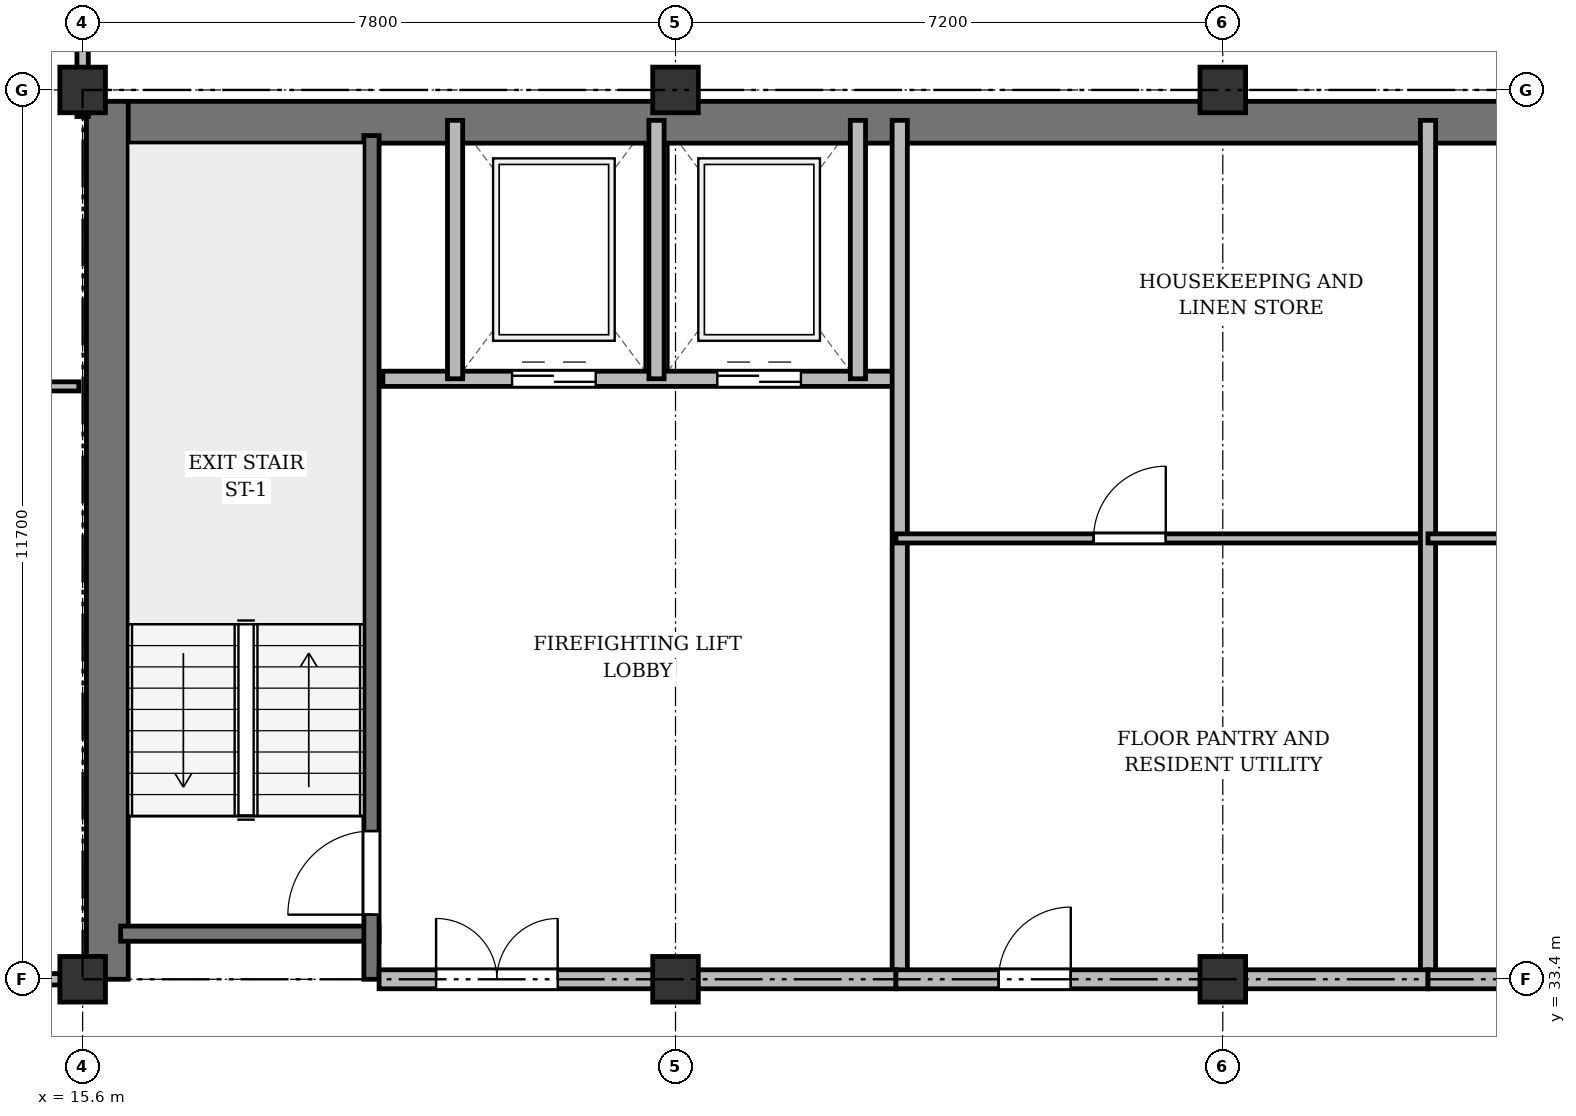
"""IFC4 building model, lengths in metres.
Left out: names, types, materials, properties, quantities, classifications, styles, units other than length and angle.
Written with IfcOpenShell. Run it as: python <this file> out.ifc"""

import sys

from ifc_helpers import new_model, si_unit, direction, frame, frame_2d, origin, origin_2d, place, context, subcontext, project, spatial, rectangle, extrude, source, transform, mapped, element, fill, save


model = new_model("IFC4")
c1 = context("Model", 3, precision=1e-05, world=origin(), true_north=direction((0.0, 1.0)))
c2 = subcontext(c1, "Body", "Model", "MODEL_VIEW")
j1 = project(units=[si_unit("LENGTHUNIT", "METRE"), si_unit("PLANEANGLEUNIT", "RADIAN")], contexts=[c1])
p1 = place(None, origin())
s1 = spatial("IfcSite", under=j1, at=p1, CompositionType="ELEMENT")
p2 = place(p1, origin())
s2 = spatial("IfcBuilding", under=s1, at=p2, CompositionType="ELEMENT")
p3 = place(p2, frame((0.0, 0.0, 281.1)))
s3 = spatial("IfcBuildingStorey", under=s2, at=p3, CompositionType="ELEMENT", Elevation=281.1)
m1 = source(origin(), c2, "Body", "SweptSolid", [
    extrude(rectangle(XDim=0.6, YDim=0.6, at=origin_2d()), origin(), (0.0, 0.0, 1.0), 3.6),
])
for number, where, z_axis, x_axis in (
    (1, (15.6, 33.4, 0.0), (0.0, 0.0, 1.0), (1.0, 0.0, 0.0)),
    (2, (15.6, 45.1, 0.0), (0.0, 0.0, 1.0), (1.0, 0.0, 0.0)),
    (3, (23.4, 33.4, 0.0), (0.0, 0.0, 1.0), (1.0, 0.0, 0.0)),
    (4, (23.4, 45.1, 0.0), (0.0, 0.0, 1.0), (1.0, 0.0, 0.0)),
    (5, (30.6, 33.4, 0.0), (0.0, 0.0, 1.0), (1.0, 0.0, 0.0)),
    (6, (30.6, 45.1, 0.0), (0.0, 0.0, 1.0), (1.0, 0.0, 0.0)),
):
    element("IfcColumn", number, at=place(p3, frame(where, z_axis=z_axis, x_axis=x_axis)), inside=s3, PredefinedType="COLUMN", context=c2, shape_type="MappedRepresentation", body=[
        mapped(m1, transform((0.0, 0.0, 0.0), x_axis=(1.0, 0.0, 0.0), y_axis=(0.0, 1.0, 0.0), z_axis=(0.0, 0.0, 1.0), scale=1.0)),
    ])
p4 = place(p3, frame((15.65, 44.675, 0.0), z_axis=(0.0, 0.0, 1.0), x_axis=(1.0, 0.0, 0.0)))
e7 = element("IfcWall", 7, at=p4, inside=s3, PredefinedType="SHEAR", context=c2, shape_type="SweptSolid", body=[
    extrude(rectangle(XDim=43.1, YDim=0.55, at=frame_2d((21.55, 0.0))), origin(), (0.0, 0.0, 1.0), 3.37),
])
p5 = place(p3, frame((15.925, 33.4, 0.0), z_axis=(0.0, 0.0, 1.0), x_axis=(0.0, 1.0, 0.0)))
e8 = element("IfcWall", 8, at=p5, inside=s3, PredefinedType="SHEAR", context=c2, shape_type="SweptSolid", body=[
    extrude(rectangle(XDim=11.55, YDim=0.55, at=frame_2d((5.775, 0.0))), origin(), (0.0, 0.0, 1.0), 3.37),
])
p6 = place(p3, frame((16.1, 34.0, 0.0), z_axis=(0.0, 0.0, 1.0), x_axis=(1.0, 0.0, 0.0)))
e9 = element("IfcWall", 9, at=p6, inside=s3, PredefinedType="SHEAR", context=c2, shape_type="SweptSolid", body=[
    extrude(rectangle(XDim=3.4, YDim=0.2, at=frame_2d((1.7, 0.0))), origin(), (0.0, 0.0, 1.0), 3.37),
])
p7 = place(p3, frame((19.4, 33.4, 0.0), z_axis=(0.0, 0.0, 1.0), x_axis=(0.0, 1.0, 0.0)))
e10 = element("IfcWall", 10, at=p7, inside=s3, PredefinedType="SHEAR", context=c2, shape_type="SweptSolid", body=[
    extrude(rectangle(XDim=11.1, YDim=0.2, at=frame_2d((5.55, 0.0))), origin(), (0.0, 0.0, 1.0), 3.37),
])
p8 = place(p7, frame((0.85, 0.0, 0.0)))
e11 = element("IfcOpeningElement", 11, at=p8, cuts=e10, PredefinedType="OPENING", context=c2, shape_type="SweptSolid", body=[
    extrude(rectangle(XDim=1.1, YDim=2.15, at=frame_2d((0.55, 1.075))), frame((0.0, 0.11, 0.0), z_axis=(0.0, -1.0, 0.0), x_axis=(1.0, 0.0, 0.0)), (0.0, 0.0, 1.0), 0.22),
])
p9 = place(p3, frame((19.55, 41.3, 0.0), z_axis=(0.0, 0.0, 1.0), x_axis=(1.0, 0.0, 0.0)))
e12 = element("IfcWall", 12, at=p9, inside=s3, PredefinedType="SOLIDWALL", context=c2, shape_type="SweptSolid", body=[
    extrude(rectangle(XDim=6.75, YDim=0.2, at=frame_2d((3.375, 0.0))), origin(), (0.0, 0.0, 1.0), 3.37),
])
p10 = place(p9, frame((1.7, 0.0, 0.0)))
e13 = element("IfcOpeningElement", 13, at=p10, cuts=e12, PredefinedType="OPENING", context=c2, shape_type="SweptSolid", body=[
    extrude(rectangle(XDim=1.1, YDim=2.15, at=frame_2d((0.55, 1.075))), frame((0.0, 0.11, 0.0), z_axis=(0.0, -1.0, 0.0), x_axis=(1.0, 0.0, 0.0)), (0.0, 0.0, 1.0), 0.22),
])
p11 = place(p9, frame((4.4, 0.0, 0.0)))
e14 = element("IfcOpeningElement", 14, at=p11, cuts=e12, PredefinedType="OPENING", context=c2, shape_type="SweptSolid", body=[
    extrude(rectangle(XDim=1.1, YDim=2.15, at=frame_2d((0.55, 1.075))), frame((0.0, 0.11, 0.0), z_axis=(0.0, -1.0, 0.0), x_axis=(1.0, 0.0, 0.0)), (0.0, 0.0, 1.0), 0.22),
])
for number, where, z_axis, x_axis in (
    (15, (20.5, 41.3, 0.0), (0.0, 0.0, 1.0), (0.0, 1.0, 0.0)),
    (16, (23.15, 41.3, 0.0), (0.0, 0.0, 1.0), (0.0, 1.0, 0.0)),
    (17, (25.8, 41.3, 0.0), (0.0, 0.0, 1.0), (0.0, 1.0, 0.0)),
):
    element("IfcWall", number, at=place(p3, frame(where, z_axis=z_axis, x_axis=x_axis)), inside=s3, PredefinedType="SOLIDWALL", context=c2, shape_type="SweptSolid", body=[
        extrude(rectangle(XDim=3.4, YDim=0.2, at=frame_2d((1.7, 0.0))), origin(), (0.0, 0.0, 1.0), 3.37),
    ])
p12 = place(p3, frame((26.35, 33.4, 0.0), z_axis=(0.0, 0.0, 1.0), x_axis=(0.0, 1.0, 0.0)))
e18 = element("IfcWall", 18, at=p12, inside=s3, PredefinedType="SOLIDWALL", context=c2, shape_type="SweptSolid", body=[
    extrude(rectangle(XDim=11.3, YDim=0.2, at=frame_2d((5.65, 0.0))), origin(), (0.0, 0.0, 1.0), 2.92),
])
p13 = place(p3, frame((19.5, 33.4, 0.0), z_axis=(0.0, 0.0, 1.0), x_axis=(1.0, 0.0, 0.0)))
e19 = element("IfcWall", 19, at=p13, inside=s3, PredefinedType="PARTITIONING", context=c2, shape_type="SweptSolid", body=[
    extrude(rectangle(XDim=6.8, YDim=0.25, at=frame_2d((3.4, 0.0))), origin(), (0.0, 0.0, 1.0), 2.92),
])
p14 = place(p13, frame((0.75, 0.0, 0.0)))
e20 = element("IfcOpeningElement", 20, at=p14, cuts=e19, PredefinedType="OPENING", context=c2, shape_type="SweptSolid", body=[
    extrude(rectangle(XDim=1.6, YDim=2.2, at=frame_2d((0.8, 1.1))), frame((0.0, 0.135, 0.0), z_axis=(0.0, -1.0, 0.0), x_axis=(1.0, 0.0, 0.0)), (0.0, 0.0, 1.0), 0.27),
])
p15 = place(p3, frame((26.3, 39.2, 0.0), z_axis=(0.0, 0.0, 1.0), x_axis=(1.0, 0.0, 0.0)))
e21 = element("IfcWall", 21, at=p15, inside=s3, PredefinedType="PARTITIONING", context=c2, shape_type="SweptSolid", body=[
    extrude(rectangle(XDim=7.0, YDim=0.12, at=frame_2d((3.5, 0.0))), origin(), (0.0, 0.0, 1.0), 2.87),
])
p16 = place(p15, frame((2.6, 0.0, 0.0)))
e22 = element("IfcOpeningElement", 22, at=p16, cuts=e21, PredefinedType="OPENING", context=c2, shape_type="SweptSolid", body=[
    extrude(rectangle(XDim=0.95, YDim=2.15, at=frame_2d((0.475, 1.075))), frame((0.0, 0.07, 0.0), z_axis=(0.0, -1.0, 0.0), x_axis=(1.0, 0.0, 0.0)), (0.0, 0.0, 1.0), 0.14),
])
p17 = place(p3, frame((33.3, 33.4, 0.0), z_axis=(0.0, 0.0, 1.0), x_axis=(0.0, 1.0, 0.0)))
e23 = element("IfcWall", 23, at=p17, inside=s3, PredefinedType="SOLIDWALL", context=c2, shape_type="SweptSolid", body=[
    extrude(rectangle(XDim=11.3, YDim=0.2, at=frame_2d((5.65, 0.0))), origin(), (0.0, 0.0, 1.0), 2.92),
])
p18 = place(p3, frame((33.3, 39.2, 0.0), z_axis=(0.0, 0.0, 1.0), x_axis=(1.0, 0.0, 0.0)))
e24 = element("IfcWall", 24, at=p18, inside=s3, PredefinedType="PARTITIONING", context=c2, shape_type="SweptSolid", body=[
    extrude(rectangle(XDim=6.8, YDim=0.12, at=frame_2d((3.4, 0.0))), origin(), (0.0, 0.0, 1.0), 3.37),
])
p19 = place(p18, frame((2.6, 0.0, 0.0)))
e25 = element("IfcOpeningElement", 25, at=p19, cuts=e24, PredefinedType="OPENING", context=c2, shape_type="SweptSolid", body=[
    extrude(rectangle(XDim=0.95, YDim=2.15, at=frame_2d((0.475, 1.075))), frame((0.0, 0.07, 0.0), z_axis=(0.0, -1.0, 0.0), x_axis=(1.0, 0.0, 0.0)), (0.0, 0.0, 1.0), 0.14),
])
p20 = place(p3, frame((26.3, 33.4, 0.0), z_axis=(0.0, 0.0, 1.0), x_axis=(1.0, 0.0, 0.0)))
e26 = element("IfcWall", 26, at=p20, inside=s3, PredefinedType="PARTITIONING", context=c2, shape_type="SweptSolid", body=[
    extrude(rectangle(XDim=7.0, YDim=0.25, at=frame_2d((3.5, 0.0))), origin(), (0.0, 0.0, 1.0), 2.92),
])
p21 = place(p20, frame((1.35, 0.0, 0.0)))
e27 = element("IfcOpeningElement", 27, at=p21, cuts=e26, PredefinedType="OPENING", context=c2, shape_type="SweptSolid", body=[
    extrude(rectangle(XDim=0.95, YDim=2.15, at=frame_2d((0.475, 1.075))), frame((0.0, 0.135, 0.0), z_axis=(0.0, -1.0, 0.0), x_axis=(1.0, 0.0, 0.0)), (0.0, 0.0, 1.0), 0.27),
])
p22 = place(p3, frame((33.3, 33.4, 0.0), z_axis=(0.0, 0.0, 1.0), x_axis=(1.0, 0.0, 0.0)))
e28 = element("IfcWall", 28, at=p22, inside=s3, PredefinedType="PARTITIONING", context=c2, shape_type="SweptSolid", body=[
    extrude(rectangle(XDim=6.8, YDim=0.25, at=frame_2d((3.4, 0.0))), origin(), (0.0, 0.0, 1.0), 2.92),
])
p23 = place(p22, frame((2.4, 0.0, 0.0)))
e29 = element("IfcOpeningElement", 29, at=p23, cuts=e28, PredefinedType="OPENING", context=c2, shape_type="SweptSolid", body=[
    extrude(rectangle(XDim=1.0, YDim=2.15, at=frame_2d((0.5, 1.075))), frame((0.0, 0.135, 0.0), z_axis=(0.0, -1.0, 0.0), x_axis=(1.0, 0.0, 0.0)), (0.0, 0.0, 1.0), 0.27),
])
p24 = place(p3, frame((8.5, 41.2, 0.0), z_axis=(0.0, 0.0, 1.0), x_axis=(1.0, 0.0, 0.0)))
e30 = element("IfcWall", 30, at=p24, inside=s3, PredefinedType="PARTITIONING", context=c2, shape_type="SweptSolid", body=[
    extrude(rectangle(XDim=7.05, YDim=0.12, at=frame_2d((3.525, 0.0))), origin(), (0.0, 0.0, 1.0), 2.87),
])
p25 = place(p24, frame((2.958, 0.0, 0.0)))
e31 = element("IfcOpeningElement", 31, at=p25, cuts=e30, PredefinedType="OPENING", context=c2, shape_type="SweptSolid", body=[
    extrude(rectangle(XDim=0.95, YDim=2.15, at=frame_2d((0.475, 1.075))), frame((0.0, 0.07, 0.0), z_axis=(0.0, -1.0, 0.0), x_axis=(1.0, 0.0, 0.0)), (0.0, 0.0, 1.0), 0.14),
])
p26 = place(p3, frame((8.45, 33.4, 0.0), z_axis=(0.0, 0.0, 1.0), x_axis=(1.0, 0.0, 0.0)))
e32 = element("IfcWall", 32, at=p26, inside=s3, PredefinedType="PARTITIONING", context=c2, shape_type="SweptSolid", body=[
    extrude(rectangle(XDim=7.15, YDim=0.15, at=frame_2d((3.575, 0.0))), origin(), (0.0, 0.0, 1.0), 2.92),
])
p27 = place(p26, frame((3.0, 0.0, 0.0)))
e33 = element("IfcOpeningElement", 33, at=p27, cuts=e32, PredefinedType="OPENING", context=c2, shape_type="SweptSolid", body=[
    extrude(rectangle(XDim=0.95, YDim=2.15, at=frame_2d((0.475, 1.075))), frame((0.0, 0.085, 0.0), z_axis=(0.0, -1.0, 0.0), x_axis=(1.0, 0.0, 0.0)), (0.0, 0.0, 1.0), 0.17),
])
p28 = place(p3, frame((15.6, 44.75, 0.0), z_axis=(0.0, 0.0, 1.0), x_axis=(0.0, 1.0, 0.0)))
e34 = element("IfcWall", 34, at=p28, inside=s3, PredefinedType="PARTITIONING", context=c2, shape_type="SweptSolid", body=[
    extrude(rectangle(XDim=3.61, YDim=0.15, at=frame_2d((1.805, 0.0))), origin(), (0.0, 0.0, 1.0), 2.87),
])
p29 = place(p28, frame((1.1, 0.0, 0.0)))
e35 = element("IfcOpeningElement", 35, at=p29, cuts=e34, PredefinedType="OPENING", context=c2, shape_type="SweptSolid", body=[
    extrude(rectangle(XDim=0.95, YDim=2.15, at=frame_2d((0.475, 1.075))), frame((0.0, 0.085, 0.0), z_axis=(0.0, -1.0, 0.0), x_axis=(1.0, 0.0, 0.0)), (0.0, 0.0, 1.0), 0.17),
])
m2 = source(origin(), c2, "Body", "SweptSolid", [
    extrude(rectangle(XDim=1.1, YDim=2.15, at=frame_2d((0.55, 1.075))), frame((0.0, 0.025, 0.0), z_axis=(0.0, -1.0, 0.0), x_axis=(1.0, 0.0, 0.0)), (0.0, 0.0, 1.0), 0.05),
])
p30 = place(p8, origin())
e36 = element("IfcDoor", 36, at=p30, inside=s3, OperationType="SINGLE_SWING_LEFT", PredefinedType="DOOR", context=c2, shape_type="MappedRepresentation", body=[
    mapped(m2, transform((0.0, 0.0, 0.0), x_axis=(1.0, 0.0, 0.0), y_axis=(0.0, 1.0, 0.0), z_axis=(0.0, 0.0, 1.0), scale=1.0)),
])
fill(e11, e36)
p31 = place(p10, origin())
e37 = element("IfcDoor", 37, at=p31, inside=s3, OperationType="DOUBLE_DOOR_SLIDING", PredefinedType="DOOR", context=c2, shape_type="MappedRepresentation", body=[
    mapped(m2, transform((0.0, 0.0, 0.0), x_axis=(1.0, 0.0, 0.0), y_axis=(0.0, 1.0, 0.0), z_axis=(0.0, 0.0, 1.0), scale=1.0)),
])
fill(e13, e37)
p32 = place(p11, origin())
e38 = element("IfcDoor", 38, at=p32, inside=s3, OperationType="DOUBLE_DOOR_SLIDING", PredefinedType="DOOR", context=c2, shape_type="MappedRepresentation", body=[
    mapped(m2, transform((0.0, 0.0, 0.0), x_axis=(1.0, 0.0, 0.0), y_axis=(0.0, 1.0, 0.0), z_axis=(0.0, 0.0, 1.0), scale=1.0)),
])
fill(e14, e38)
m3 = source(origin(), c2, "Body", "SweptSolid", [
    extrude(rectangle(XDim=1.6, YDim=2.2, at=frame_2d((0.8, 1.1))), frame((0.0, 0.025, 0.0), z_axis=(0.0, -1.0, 0.0), x_axis=(1.0, 0.0, 0.0)), (0.0, 0.0, 1.0), 0.05),
])
p33 = place(p14, origin())
e39 = element("IfcDoor", 39, at=p33, inside=s3, OperationType="DOUBLE_DOOR_SINGLE_SWING", PredefinedType="DOOR", context=c2, shape_type="MappedRepresentation", body=[
    mapped(m3, transform((0.0, 0.0, 0.0), x_axis=(1.0, 0.0, 0.0), y_axis=(0.0, 1.0, 0.0), z_axis=(0.0, 0.0, 1.0), scale=1.0)),
])
fill(e20, e39)
m4 = source(origin(), c2, "Body", "SweptSolid", [
    extrude(rectangle(XDim=0.95, YDim=2.15, at=frame_2d((0.475, 1.075))), frame((0.0, 0.025, 0.0), z_axis=(0.0, -1.0, 0.0), x_axis=(1.0, 0.0, 0.0)), (0.0, 0.0, 1.0), 0.05),
])
p34 = place(p16, origin())
e40 = element("IfcDoor", 40, at=p34, inside=s3, OperationType="SINGLE_SWING_RIGHT", PredefinedType="DOOR", context=c2, shape_type="MappedRepresentation", body=[
    mapped(m4, transform((0.0, 0.0, 0.0), x_axis=(1.0, 0.0, 0.0), y_axis=(0.0, 1.0, 0.0), z_axis=(0.0, 0.0, 1.0), scale=1.0)),
])
fill(e22, e40)
p35 = place(p21, origin())
e41 = element("IfcDoor", 41, at=p35, inside=s3, OperationType="SINGLE_SWING_RIGHT", PredefinedType="DOOR", context=c2, shape_type="MappedRepresentation", body=[
    mapped(m4, transform((0.0, 0.0, 0.0), x_axis=(1.0, 0.0, 0.0), y_axis=(0.0, 1.0, 0.0), z_axis=(0.0, 0.0, 1.0), scale=1.0)),
])
fill(e27, e41)
save(model, sys.argv[1])
